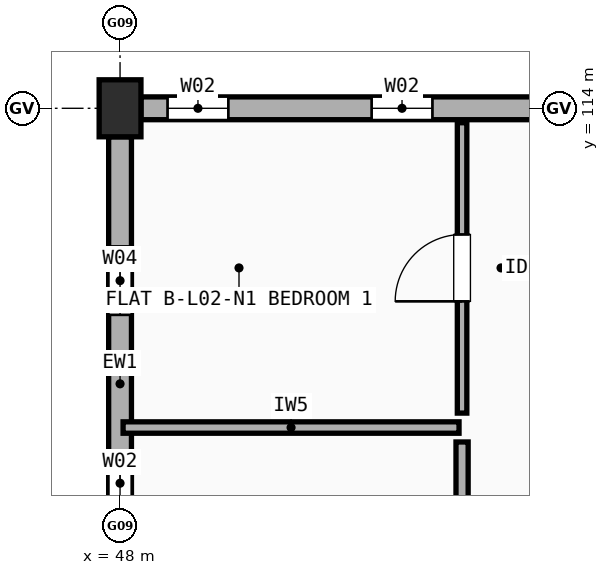
"""IFC4 building model, lengths in metres.
Left out: names, types, materials, properties, quantities, classifications, styles, units other than length and angle.
Written with IfcOpenShell. Run it as: python <this file> out.ifc"""

import sys

from ifc_helpers import new_model, si_unit, direction, frame, frame_2d, origin, origin_2d, place, context, subcontext, project, spatial, rectangle, extrude, element, fill, save


model = new_model("IFC4")
c1 = context("Model", 3, precision=1e-05, world=origin(), true_north=direction((0.0, 1.0)))
c2 = subcontext(c1, "Body", "Model", "MODEL_VIEW")
j1 = project(units=[si_unit("LENGTHUNIT", "METRE"), si_unit("PLANEANGLEUNIT", "RADIAN")], contexts=[c1])
p1 = place(None, origin())
s1 = spatial("IfcSite", under=j1, at=p1, CompositionType="ELEMENT")
p2 = place(p1, origin())
s2 = spatial("IfcBuilding", under=s1, at=p2, CompositionType="ELEMENT")
p3 = place(p2, frame((0.0, 0.0, 7.7)))
s3 = spatial("IfcBuildingStorey", under=s2, at=p3, CompositionType="ELEMENT", Elevation=7.7)
p4 = place(p3, frame((48.0, 114.0, 0.0), z_axis=(0.0, 0.0, 1.0), x_axis=(1.0, 0.0, 0.0)))
e1 = element("IfcColumn", 1, at=p4, inside=s3, PredefinedType="COLUMN", context=c2, shape_type="SweptSolid", body=[
    extrude(rectangle(XDim=0.55, YDim=0.75, at=origin_2d()), origin(), (0.0, 0.0, 1.0), 2.955),
])
p5 = place(p3, frame((53.675, 114.0, 0.0), z_axis=(0.0, 0.0, 1.0), x_axis=(-1.0, 0.0, 0.0)))
e2 = element("IfcWall", 2, at=p5, inside=s3, PredefinedType="STANDARD", context=c2, shape_type="SweptSolid", body=[
    extrude(rectangle(XDim=5.4, YDim=0.3, at=frame_2d((2.7, 0.0))), origin(), (0.0, 0.0, 1.0), 2.437),
])
p6 = place(p5, frame((1.565, 0.0, 0.9)))
e3 = element("IfcOpeningElement", 3, at=p6, cuts=e2, PredefinedType="OPENING", context=c2, shape_type="SweptSolid", body=[
    extrude(rectangle(XDim=0.8, YDim=1.2, at=frame_2d((0.4, 0.6))), frame((0.0, 0.16, 0.0), z_axis=(0.0, -1.0, 0.0), x_axis=(1.0, 0.0, 0.0)), (0.0, 0.0, 1.0), 0.32),
])
p7 = place(p5, frame((4.25, 0.0, 0.9)))
e4 = element("IfcOpeningElement", 4, at=p7, cuts=e2, PredefinedType="OPENING", context=c2, shape_type="SweptSolid", body=[
    extrude(rectangle(XDim=0.8, YDim=1.2, at=frame_2d((0.4, 0.6))), frame((0.0, 0.16, 0.0), z_axis=(0.0, -1.0, 0.0), x_axis=(1.0, 0.0, 0.0)), (0.0, 0.0, 1.0), 0.32),
])
p8 = place(p3, frame((48.0, 113.625, 0.0), z_axis=(0.0, 0.0, 1.0), x_axis=(0.0, -1.0, 0.0)))
e5 = element("IfcWall", 5, at=p8, inside=s3, PredefinedType="STANDARD", context=c2, shape_type="SweptSolid", body=[
    extrude(rectangle(XDim=5.25, YDim=0.3, at=frame_2d((2.625, 0.0))), origin(), (0.0, 0.0, 1.0), 2.437),
])
p9 = place(p8, frame((1.442, 0.0, 0.9)))
e6 = element("IfcOpeningElement", 6, at=p9, cuts=e5, PredefinedType="OPENING", context=c2, shape_type="SweptSolid", body=[
    extrude(rectangle(XDim=0.9, YDim=1.3, at=frame_2d((0.45, 0.65))), frame((0.0, 0.16, 0.0), z_axis=(0.0, -1.0, 0.0), x_axis=(1.0, 0.0, 0.0)), (0.0, 0.0, 1.0), 0.32),
])
p10 = place(p8, frame((4.157, 0.0, 0.9)))
e7 = element("IfcOpeningElement", 7, at=p10, cuts=e5, PredefinedType="OPENING", context=c2, shape_type="SweptSolid", body=[
    extrude(rectangle(XDim=0.8, YDim=1.2, at=frame_2d((0.4, 0.6))), frame((0.0, 0.16, 0.0), z_axis=(0.0, -1.0, 0.0), x_axis=(1.0, 0.0, 0.0)), (0.0, 0.0, 1.0), 0.32),
])
p11 = place(p3, frame((52.5, 109.99, 0.0), z_axis=(0.0, 0.0, 1.0), x_axis=(0.0, 1.0, 0.0)))
e8 = element("IfcWall", 8, at=p11, inside=s3, PredefinedType="PARTITIONING", context=c2, shape_type="SweptSolid", body=[
    extrude(rectangle(XDim=3.82, YDim=0.125, at=frame_2d((1.91, 0.0))), origin(), (0.0, 0.0, 1.0), 2.955),
])
p12 = place(p11, frame((1.47, 0.0, 0.0)))
e9 = element("IfcOpeningElement", 9, at=p12, cuts=e8, PredefinedType="OPENING", context=c2, shape_type="SweptSolid", body=[
    extrude(rectangle(XDim=0.88, YDim=2.1, at=frame_2d((0.44, 1.05))), frame((0.0, 0.073, 0.0), z_axis=(0.0, -1.0, 0.0), x_axis=(1.0, 0.0, 0.0)), (0.0, 0.0, 1.0), 0.145),
])
p13 = place(p3, frame((52.5, 102.24, 0.0), z_axis=(0.0, 0.0, 1.0), x_axis=(0.0, 1.0, 0.0)))
e10 = element("IfcWall", 10, at=p13, inside=s3, PredefinedType="PLUMBINGWALL", context=c2, shape_type="SweptSolid", body=[
    extrude(rectangle(XDim=7.37, YDim=0.16, at=frame_2d((3.685, 0.0))), origin(), (0.0, 0.0, 1.0), 2.437),
])
p14 = place(p13, frame((3.235, 0.0, 0.0)))
e11 = element("IfcOpeningElement", 11, at=p14, cuts=e10, PredefinedType="OPENING", context=c2, shape_type="SweptSolid", body=[
    extrude(rectangle(XDim=0.9, YDim=2.1, at=frame_2d((0.45, 1.05))), frame((0.0, 0.09, 0.0), z_axis=(0.0, -1.0, 0.0), x_axis=(1.0, 0.0, 0.0)), (0.0, 0.0, 1.0), 0.18),
])
p15 = place(p3, frame((48.04, 109.8, 0.0), z_axis=(0.0, 0.0, 1.0), x_axis=(1.0, 0.0, 0.0)))
e12 = element("IfcWall", 12, at=p15, inside=s3, PredefinedType="PARTITIONING", context=c2, shape_type="SweptSolid", body=[
    extrude(rectangle(XDim=4.42, YDim=0.15, at=frame_2d((2.21, 0.0))), origin(), (0.0, 0.0, 1.0), 2.437),
])
p16 = place(p6, origin())
e13 = element("IfcWindow", 13, at=p16, inside=s3, PartitioningType="SINGLE_PANEL", PredefinedType="WINDOW", context=c2, shape_type="SweptSolid", body=[
    extrude(rectangle(XDim=0.8, YDim=1.2, at=frame_2d((0.4, 0.6))), frame((0.0, 0.03, 0.0), z_axis=(0.0, -1.0, 0.0), x_axis=(1.0, 0.0, 0.0)), (0.0, 0.0, 1.0), 0.06),
])
fill(e3, e13)
p17 = place(p7, origin())
e14 = element("IfcWindow", 14, at=p17, inside=s3, PartitioningType="SINGLE_PANEL", PredefinedType="WINDOW", context=c2, shape_type="SweptSolid", body=[
    extrude(rectangle(XDim=0.8, YDim=1.2, at=frame_2d((0.4, 0.6))), frame((0.0, 0.03, 0.0), z_axis=(0.0, -1.0, 0.0), x_axis=(1.0, 0.0, 0.0)), (0.0, 0.0, 1.0), 0.06),
])
fill(e4, e14)
p18 = place(p9, origin())
e15 = element("IfcWindow", 15, at=p18, inside=s3, PartitioningType="SINGLE_PANEL", PredefinedType="WINDOW", context=c2, shape_type="SweptSolid", body=[
    extrude(rectangle(XDim=0.9, YDim=1.3, at=frame_2d((0.45, 0.65))), frame((0.0, 0.03, 0.0), z_axis=(0.0, -1.0, 0.0), x_axis=(1.0, 0.0, 0.0)), (0.0, 0.0, 1.0), 0.06),
])
fill(e6, e15)
p19 = place(p10, origin())
e16 = element("IfcWindow", 16, at=p19, inside=s3, PartitioningType="SINGLE_PANEL", PredefinedType="WINDOW", context=c2, shape_type="SweptSolid", body=[
    extrude(rectangle(XDim=0.8, YDim=1.2, at=frame_2d((0.4, 0.6))), frame((0.0, 0.03, 0.0), z_axis=(0.0, -1.0, 0.0), x_axis=(1.0, 0.0, 0.0)), (0.0, 0.0, 1.0), 0.06),
])
fill(e7, e16)
p20 = place(p12, origin())
e17 = element("IfcDoor", 17, at=p20, inside=s3, OperationType="SINGLE_SWING_LEFT", PredefinedType="DOOR", context=c2, shape_type="SweptSolid", body=[
    extrude(rectangle(XDim=0.88, YDim=2.1, at=frame_2d((0.44, 1.05))), frame((0.0, 0.025, 0.0), z_axis=(0.0, -1.0, 0.0), x_axis=(1.0, 0.0, 0.0)), (0.0, 0.0, 1.0), 0.05),
])
fill(e9, e17)
save(model, sys.argv[1])
